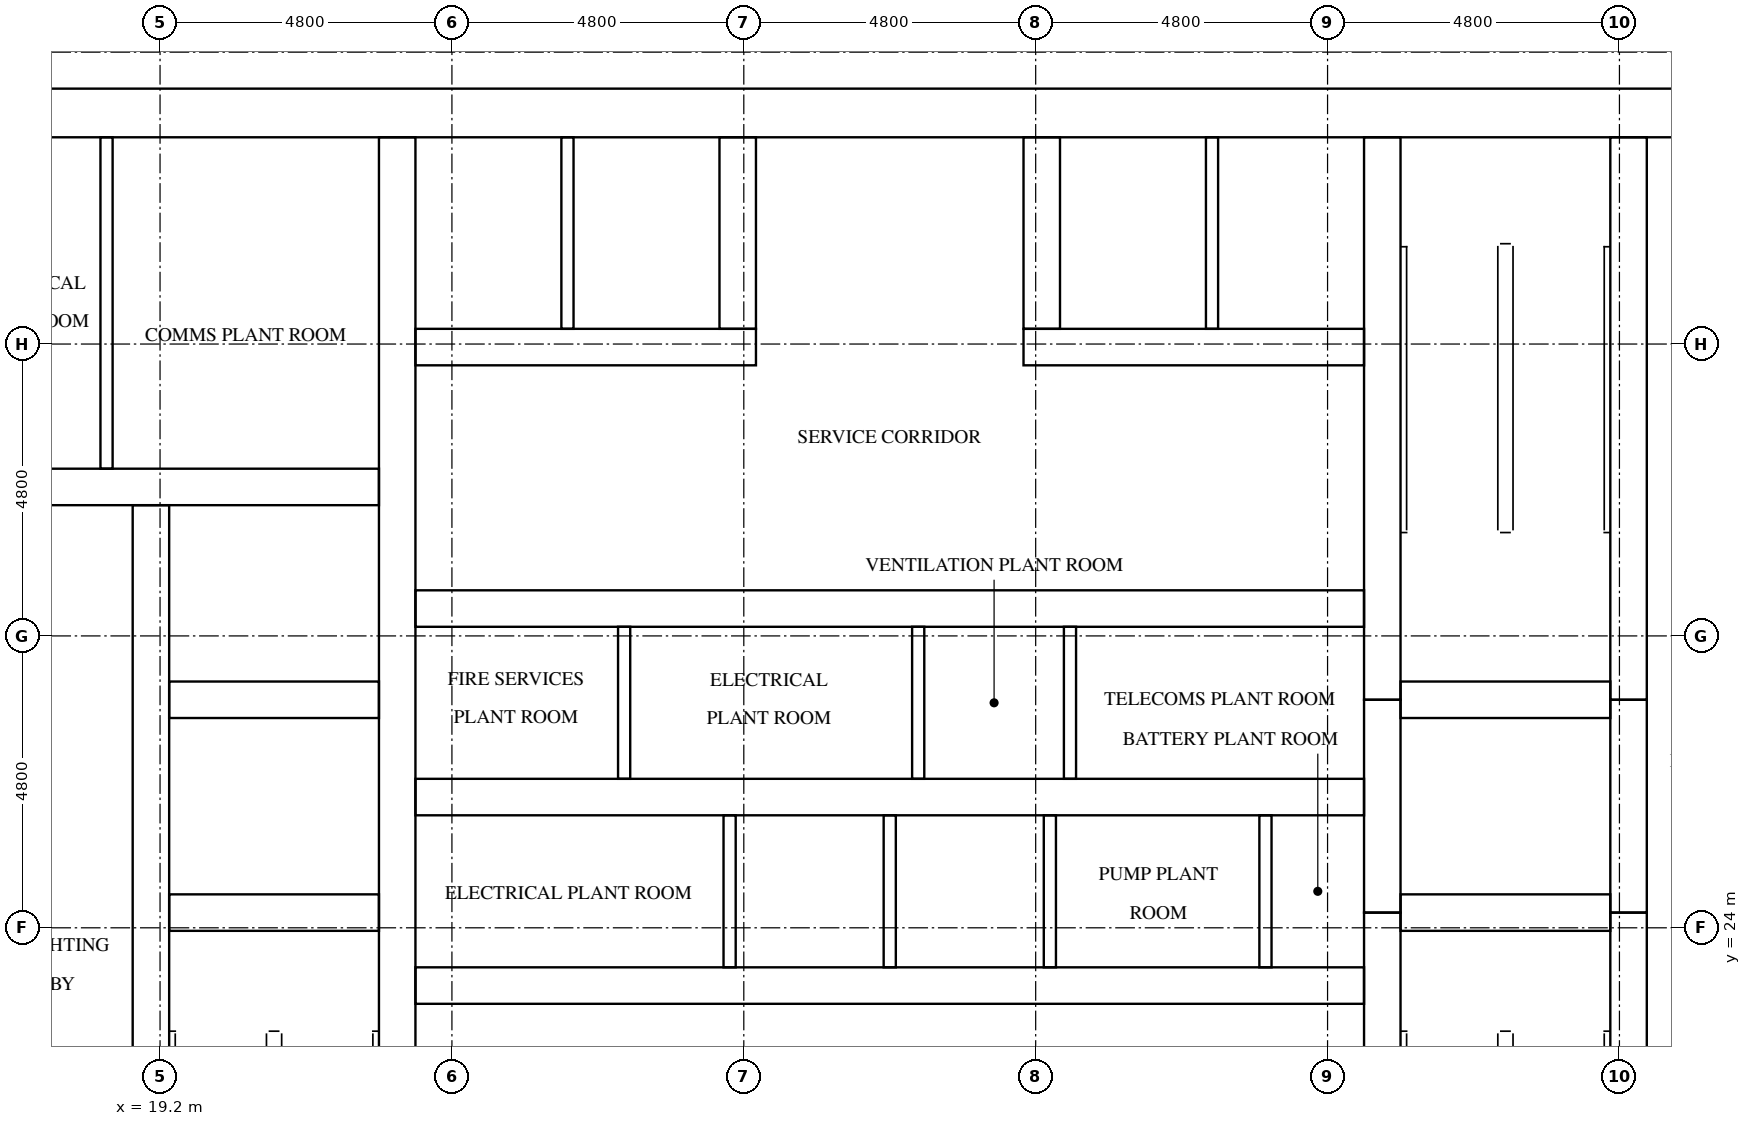
"""IFC4 building model, lengths in metres.
Left out: names, types, materials, properties, quantities, classifications, styles, units other than length and angle.
Written with IfcOpenShell. Run it as: python <this file> out.ifc"""

import sys

from ifc_helpers import new_model, si_unit, direction, frame, frame_2d, origin, place, context, subcontext, project, spatial, rectangle, extrude, element, fill, save


model = new_model("IFC4")
c1 = context("Model", 3, precision=1e-05, world=origin(), true_north=direction((0.0, 1.0)))
c2 = subcontext(c1, "Body", "Model", "MODEL_VIEW")
j1 = project(units=[si_unit("LENGTHUNIT", "METRE"), si_unit("PLANEANGLEUNIT", "RADIAN")], contexts=[c1])
p1 = place(None, origin())
s1 = spatial("IfcSite", under=j1, at=p1, CompositionType="ELEMENT")
p2 = place(p1, origin())
s2 = spatial("IfcBuilding", under=s1, at=p2, CompositionType="ELEMENT")
p3 = place(p2, frame((0.0, 0.0, 113.7)))
s3 = spatial("IfcBuildingStorey", under=s2, at=p3, CompositionType="ELEMENT", Elevation=113.7)
p4 = place(p3, frame((15.0, 37.4, 0.0), z_axis=(0.0, 0.0, 1.0), x_axis=(1.0, 0.0, 0.0)))
e1 = element("IfcWall", 1, at=p4, inside=s3, PredefinedType="SHEAR", context=c2, shape_type="SweptSolid", body=[
    extrude(rectangle(XDim=32.4, YDim=0.8, at=frame_2d((16.2, 0.0))), origin(), (0.0, 0.0, 1.0), 5.1),
])
p5 = place(p4, frame((15.3, 0.0, 0.0)))
e2 = element("IfcOpeningElement", 2, at=p5, cuts=e1, PredefinedType="OPENING", context=c2, shape_type="SweptSolid", body=[
    extrude(rectangle(XDim=1.8, YDim=2.1, at=frame_2d((0.9, 1.05))), frame((0.0, 0.41, 0.0), z_axis=(0.0, -1.0, 0.0), x_axis=(1.0, 0.0, 0.0)), (0.0, 0.0, 1.0), 0.82),
])
p6 = place(p4, frame((1.51, 0.0, 0.0)))
e3 = element("IfcOpeningElement", 3, at=p6, cuts=e1, PredefinedType="OPENING", context=c2, shape_type="SweptSolid", body=[
    extrude(rectangle(XDim=1.0, YDim=2.1, at=frame_2d((0.5, 1.05))), frame((0.0, 0.41, 0.0), z_axis=(0.0, -1.0, 0.0), x_axis=(1.0, 0.0, 0.0)), (0.0, 0.0, 1.0), 0.82),
])
p7 = place(p4, frame((5.11, 0.0, 0.0)))
e4 = element("IfcOpeningElement", 4, at=p7, cuts=e1, PredefinedType="OPENING", context=c2, shape_type="SweptSolid", body=[
    extrude(rectangle(XDim=1.0, YDim=2.1, at=frame_2d((0.5, 1.05))), frame((0.0, 0.41, 0.0), z_axis=(0.0, -1.0, 0.0), x_axis=(1.0, 0.0, 0.0)), (0.0, 0.0, 1.0), 0.82),
])
p8 = place(p3, frame((19.05, 15.8, 0.0), z_axis=(0.0, 0.0, 1.0), x_axis=(0.0, 1.0, 0.0)))
e5 = element("IfcWall", 5, at=p8, inside=s3, PredefinedType="SHEAR", context=c2, shape_type="SweptSolid", body=[
    extrude(rectangle(XDim=15.15, YDim=0.6, at=frame_2d((7.575, 0.0))), origin(), (0.0, 0.0, 1.0), 5.1),
])
p9 = place(p8, frame((9.65, 0.0, 0.0)))
e6 = element("IfcOpeningElement", 6, at=p9, cuts=e5, PredefinedType="OPENING", context=c2, shape_type="SweptSolid", body=[
    extrude(rectangle(XDim=1.1, YDim=2.1, at=frame_2d((0.55, 1.05))), frame((0.0, 0.31, 0.0), z_axis=(0.0, -1.0, 0.0), x_axis=(1.0, 0.0, 0.0)), (0.0, 0.0, 1.0), 0.62),
])
p10 = place(p8, frame((13.15, 0.0, 0.0)))
e7 = element("IfcOpeningElement", 7, at=p10, cuts=e5, PredefinedType="OPENING", context=c2, shape_type="SweptSolid", body=[
    extrude(rectangle(XDim=1.1, YDim=2.1, at=frame_2d((0.55, 1.05))), frame((0.0, 0.31, 0.0), z_axis=(0.0, -1.0, 0.0), x_axis=(1.0, 0.0, 0.0)), (0.0, 0.0, 1.0), 0.62),
])
p11 = place(p8, frame((0.4, 0.0, 0.0)))
e8 = element("IfcOpeningElement", 8, at=p11, cuts=e5, PredefinedType="OPENING", context=c2, shape_type="SweptSolid", body=[
    extrude(rectangle(XDim=1.2, YDim=2.1, at=frame_2d((0.6, 1.05))), frame((0.0, 0.31, 0.0), z_axis=(0.0, -1.0, 0.0), x_axis=(1.0, 0.0, 0.0)), (0.0, 0.0, 1.0), 0.62),
])
p12 = place(p3, frame((23.1, 15.8, 0.0), z_axis=(0.0, 0.0, 1.0), x_axis=(0.0, 1.0, 0.0)))
e9 = element("IfcWall", 9, at=p12, inside=s3, PredefinedType="SHEAR", context=c2, shape_type="SweptSolid", body=[
    extrude(rectangle(XDim=21.2, YDim=0.6, at=frame_2d((10.6, 0.0))), origin(), (0.0, 0.0, 1.0), 5.1),
])
p13 = place(p3, frame((39.3, 15.8, 0.0), z_axis=(0.0, 0.0, 1.0), x_axis=(0.0, 1.0, 0.0)))
e10 = element("IfcWall", 10, at=p13, inside=s3, PredefinedType="SHEAR", context=c2, shape_type="SweptSolid", body=[
    extrude(rectangle(XDim=8.45, YDim=0.6, at=frame_2d((4.225, 0.0))), origin(), (0.0, 0.0, 1.0), 5.1),
])
p14 = place(p3, frame((39.3, 24.25, 0.0), z_axis=(0.0, 0.0, 1.0), x_axis=(0.0, 1.0, 0.0)))
e11 = element("IfcWall", 11, at=p14, inside=s3, PredefinedType="SHEAR", context=c2, shape_type="SweptSolid", body=[
    extrude(rectangle(XDim=3.5, YDim=0.6, at=frame_2d((1.75, 0.0))), origin(), (0.0, 0.0, 1.0), 5.1),
])
p15 = place(p3, frame((39.3, 27.75, 0.0), z_axis=(0.0, 0.0, 1.0), x_axis=(0.0, 1.0, 0.0)))
e12 = element("IfcWall", 12, at=p15, inside=s3, PredefinedType="SHEAR", context=c2, shape_type="SweptSolid", body=[
    extrude(rectangle(XDim=9.25, YDim=0.6, at=frame_2d((4.625, 0.0))), origin(), (0.0, 0.0, 1.0), 5.1),
])
p16 = place(p3, frame((43.35, 15.8, 0.0), z_axis=(0.0, 0.0, 1.0), x_axis=(0.0, 1.0, 0.0)))
e13 = element("IfcWall", 13, at=p16, inside=s3, PredefinedType="SHEAR", context=c2, shape_type="SweptSolid", body=[
    extrude(rectangle(XDim=8.45, YDim=0.6, at=frame_2d((4.225, 0.0))), origin(), (0.0, 0.0, 1.0), 5.1),
])
p17 = place(p16, frame((0.4, 0.0, 0.0)))
e14 = element("IfcOpeningElement", 14, at=p17, cuts=e13, PredefinedType="OPENING", context=c2, shape_type="SweptSolid", body=[
    extrude(rectangle(XDim=1.2, YDim=2.1, at=frame_2d((0.6, 1.05))), frame((0.0, 0.31, 0.0), z_axis=(0.0, -1.0, 0.0), x_axis=(1.0, 0.0, 0.0)), (0.0, 0.0, 1.0), 0.62),
])
p18 = place(p3, frame((43.35, 24.25, 0.0), z_axis=(0.0, 0.0, 1.0), x_axis=(0.0, 1.0, 0.0)))
e15 = element("IfcWall", 15, at=p18, inside=s3, PredefinedType="SHEAR", context=c2, shape_type="SweptSolid", body=[
    extrude(rectangle(XDim=3.5, YDim=0.6, at=frame_2d((1.75, 0.0))), origin(), (0.0, 0.0, 1.0), 5.1),
])
p19 = place(p18, frame((1.2, 0.0, 0.0)))
e16 = element("IfcOpeningElement", 16, at=p19, cuts=e15, PredefinedType="OPENING", context=c2, shape_type="SweptSolid", body=[
    extrude(rectangle(XDim=1.1, YDim=2.1, at=frame_2d((0.55, 1.05))), frame((0.0, 0.31, 0.0), z_axis=(0.0, -1.0, 0.0), x_axis=(1.0, 0.0, 0.0)), (0.0, 0.0, 1.0), 0.62),
])
p20 = place(p3, frame((43.35, 27.75, 0.0), z_axis=(0.0, 0.0, 1.0), x_axis=(0.0, 1.0, 0.0)))
e17 = element("IfcWall", 17, at=p20, inside=s3, PredefinedType="SHEAR", context=c2, shape_type="SweptSolid", body=[
    extrude(rectangle(XDim=9.25, YDim=0.6, at=frame_2d((4.625, 0.0))), origin(), (0.0, 0.0, 1.0), 5.1),
])
p21 = place(p20, frame((7.65, 0.0, 0.0)))
e18 = element("IfcOpeningElement", 18, at=p21, cuts=e17, PredefinedType="OPENING", context=c2, shape_type="SweptSolid", body=[
    extrude(rectangle(XDim=1.2, YDim=2.1, at=frame_2d((0.6, 1.05))), frame((0.0, 0.31, 0.0), z_axis=(0.0, -1.0, 0.0), x_axis=(1.0, 0.0, 0.0)), (0.0, 0.0, 1.0), 0.62),
])
for number, where, z_axis, x_axis in (
    (19, (19.35, 24.25, 0.0), (0.0, 0.0, 1.0), (1.0, 0.0, 0.0)),
    (20, (19.35, 27.75, 0.0), (0.0, 0.0, 1.0), (1.0, 0.0, 0.0)),
):
    element("IfcWall", number, at=place(p3, frame(where, z_axis=z_axis, x_axis=x_axis)), inside=s3, PredefinedType="SHEAR", context=c2, shape_type="SweptSolid", body=[
        extrude(rectangle(XDim=3.45, YDim=0.6, at=frame_2d((1.725, 0.0))), origin(), (0.0, 0.0, 1.0), 5.1),
    ])
p22 = place(p3, frame((15.8, 31.25, 0.0), z_axis=(0.0, 0.0, 1.0), x_axis=(1.0, 0.0, 0.0)))
e21 = element("IfcWall", 21, at=p22, inside=s3, PredefinedType="SHEAR", context=c2, shape_type="SweptSolid", body=[
    extrude(rectangle(XDim=7.0, YDim=0.6, at=frame_2d((3.5, 0.0))), origin(), (0.0, 0.0, 1.0), 5.1),
])
for number, where, z_axis, x_axis in (
    (22, (39.6, 24.25, 0.0), (0.0, 0.0, 1.0), (1.0, 0.0, 0.0)),
    (23, (39.6, 27.75, 0.0), (0.0, 0.0, 1.0), (1.0, 0.0, 0.0)),
):
    element("IfcWall", number, at=place(p3, frame(where, z_axis=z_axis, x_axis=x_axis)), inside=s3, PredefinedType="SHEAR", context=c2, shape_type="SweptSolid", body=[
        extrude(rectangle(XDim=3.45, YDim=0.6, at=frame_2d((1.725, 0.0))), origin(), (0.0, 0.0, 1.0), 5.1),
    ])
p23 = place(p3, frame((23.4, 23.05, 0.0), z_axis=(0.0, 0.0, 1.0), x_axis=(1.0, 0.0, 0.0)))
e24 = element("IfcWall", 24, at=p23, inside=s3, PredefinedType="SHEAR", context=c2, shape_type="SweptSolid", body=[
    extrude(rectangle(XDim=15.6, YDim=0.6, at=frame_2d((7.8, 0.0))), origin(), (0.0, 0.0, 1.0), 5.1),
])
p24 = place(p23, frame((2.033, 0.0, 0.0)))
e25 = element("IfcOpeningElement", 25, at=p24, cuts=e24, PredefinedType="OPENING", context=c2, shape_type="SweptSolid", body=[
    extrude(rectangle(XDim=1.0, YDim=2.1, at=frame_2d((0.5, 1.05))), frame((0.0, 0.31, 0.0), z_axis=(0.0, -1.0, 0.0), x_axis=(1.0, 0.0, 0.0)), (0.0, 0.0, 1.0), 0.62),
])
p25 = place(p23, frame((11.706, 0.0, 0.0)))
e26 = element("IfcOpeningElement", 26, at=p25, cuts=e24, PredefinedType="OPENING", context=c2, shape_type="SweptSolid", body=[
    extrude(rectangle(XDim=1.0, YDim=2.1, at=frame_2d((0.5, 1.05))), frame((0.0, 0.31, 0.0), z_axis=(0.0, -1.0, 0.0), x_axis=(1.0, 0.0, 0.0)), (0.0, 0.0, 1.0), 0.62),
])
p26 = place(p23, frame((14.339, 0.0, 0.0)))
e27 = element("IfcOpeningElement", 27, at=p26, cuts=e24, PredefinedType="OPENING", context=c2, shape_type="SweptSolid", body=[
    extrude(rectangle(XDim=1.0, YDim=2.1, at=frame_2d((0.5, 1.05))), frame((0.0, 0.31, 0.0), z_axis=(0.0, -1.0, 0.0), x_axis=(1.0, 0.0, 0.0)), (0.0, 0.0, 1.0), 0.62),
])
p27 = place(p3, frame((23.4, 26.15, 0.0), z_axis=(0.0, 0.0, 1.0), x_axis=(1.0, 0.0, 0.0)))
e28 = element("IfcWall", 28, at=p27, inside=s3, PredefinedType="SHEAR", context=c2, shape_type="SweptSolid", body=[
    extrude(rectangle(XDim=15.6, YDim=0.6, at=frame_2d((7.8, 0.0))), origin(), (0.0, 0.0, 1.0), 5.1),
])
p28 = place(p3, frame((23.4, 29.25, 0.0), z_axis=(0.0, 0.0, 1.0), x_axis=(1.0, 0.0, 0.0)))
e29 = element("IfcWall", 29, at=p28, inside=s3, PredefinedType="SHEAR", context=c2, shape_type="SweptSolid", body=[
    extrude(rectangle(XDim=15.6, YDim=0.6, at=frame_2d((7.8, 0.0))), origin(), (0.0, 0.0, 1.0), 5.1),
])
p29 = place(p28, frame((1.166, 0.0, 0.0)))
e30 = element("IfcOpeningElement", 30, at=p29, cuts=e29, PredefinedType="OPENING", context=c2, shape_type="SweptSolid", body=[
    extrude(rectangle(XDim=1.0, YDim=2.1, at=frame_2d((0.5, 1.05))), frame((0.0, 0.31, 0.0), z_axis=(0.0, -1.0, 0.0), x_axis=(1.0, 0.0, 0.0)), (0.0, 0.0, 1.0), 0.62),
])
p30 = place(p28, frame((5.35, 0.0, 0.0)))
e31 = element("IfcOpeningElement", 31, at=p30, cuts=e29, PredefinedType="OPENING", context=c2, shape_type="SweptSolid", body=[
    extrude(rectangle(XDim=1.0, YDim=2.1, at=frame_2d((0.5, 1.05))), frame((0.0, 0.31, 0.0), z_axis=(0.0, -1.0, 0.0), x_axis=(1.0, 0.0, 0.0)), (0.0, 0.0, 1.0), 0.62),
])
p31 = place(p28, frame((9.016, 0.0, 0.0)))
e32 = element("IfcOpeningElement", 32, at=p31, cuts=e29, PredefinedType="OPENING", context=c2, shape_type="SweptSolid", body=[
    extrude(rectangle(XDim=1.0, YDim=2.1, at=frame_2d((0.5, 1.05))), frame((0.0, 0.31, 0.0), z_axis=(0.0, -1.0, 0.0), x_axis=(1.0, 0.0, 0.0)), (0.0, 0.0, 1.0), 0.62),
])
p32 = place(p28, frame((12.732, 0.0, 0.0)))
e33 = element("IfcOpeningElement", 33, at=p32, cuts=e29, PredefinedType="OPENING", context=c2, shape_type="SweptSolid", body=[
    extrude(rectangle(XDim=1.0, YDim=2.1, at=frame_2d((0.5, 1.05))), frame((0.0, 0.31, 0.0), z_axis=(0.0, -1.0, 0.0), x_axis=(1.0, 0.0, 0.0)), (0.0, 0.0, 1.0), 0.62),
])
for number, where, z_axis, x_axis in (
    (34, (23.4, 33.55, 0.0), (0.0, 0.0, 1.0), (1.0, 0.0, 0.0)),
    (35, (33.4, 33.55, 0.0), (0.0, 0.0, 1.0), (1.0, 0.0, 0.0)),
):
    element("IfcWall", number, at=place(p3, frame(where, z_axis=z_axis, x_axis=x_axis)), inside=s3, PredefinedType="SHEAR", context=c2, shape_type="SweptSolid", body=[
        extrude(rectangle(XDim=5.6, YDim=0.6, at=frame_2d((2.8, 0.0))), origin(), (0.0, 0.0, 1.0), 5.1),
    ])
for number, where, z_axis, x_axis in (
    (36, (28.7, 33.85, 0.0), (0.0, 0.0, 1.0), (0.0, 1.0, 0.0)),
    (37, (33.7, 33.85, 0.0), (0.0, 0.0, 1.0), (0.0, 1.0, 0.0)),
):
    element("IfcWall", number, at=place(p3, frame(where, z_axis=z_axis, x_axis=x_axis)), inside=s3, PredefinedType="SHEAR", context=c2, shape_type="SweptSolid", body=[
        extrude(rectangle(XDim=3.15, YDim=0.6, at=frame_2d((1.575, 0.0))), origin(), (0.0, 0.0, 1.0), 5.1),
    ])
for number, where, z_axis, x_axis in (
    (38, (28.567, 23.35, 0.0), (0.0, 0.0, 1.0), (0.0, 1.0, 0.0)),
    (39, (31.2, 23.35, 0.0), (0.0, 0.0, 1.0), (0.0, 1.0, 0.0)),
    (40, (33.833, 23.35, 0.0), (0.0, 0.0, 1.0), (0.0, 1.0, 0.0)),
):
    element("IfcWall", number, at=place(p3, frame(where, z_axis=z_axis, x_axis=x_axis)), inside=s3, PredefinedType="SOLIDWALL", context=c2, shape_type="SweptSolid", body=[
        extrude(rectangle(XDim=2.5, YDim=0.2, at=frame_2d((1.25, 0.0))), origin(), (0.0, 0.0, 1.0), 5.1),
    ])
for number, where, z_axis, x_axis in (
    (41, (25.9, 33.85, 0.0), (0.0, 0.0, 1.0), (0.0, 1.0, 0.0)),
    (42, (36.5, 33.85, 0.0), (0.0, 0.0, 1.0), (0.0, 1.0, 0.0)),
):
    element("IfcWall", number, at=place(p3, frame(where, z_axis=z_axis, x_axis=x_axis)), inside=s3, PredefinedType="SOLIDWALL", context=c2, shape_type="SweptSolid", body=[
        extrude(rectangle(XDim=3.15, YDim=0.2, at=frame_2d((1.575, 0.0))), origin(), (0.0, 0.0, 1.0), 5.1),
    ])
p33 = place(p3, frame((18.32, 31.55, 0.0), z_axis=(0.0, 0.0, 1.0), x_axis=(0.0, 1.0, 0.0)))
e43 = element("IfcWall", 43, at=p33, inside=s3, PredefinedType="PARTITIONING", context=c2, shape_type="SweptSolid", body=[
    extrude(rectangle(XDim=5.45, YDim=0.2, at=frame_2d((2.725, 0.0))), origin(), (0.0, 0.0, 1.0), 5.1),
])
for number, where, z_axis, x_axis in (
    (44, (37.379, 23.35, 0.0), (0.0, 0.0, 1.0), (0.0, 1.0, 0.0)),
    (45, (26.832, 26.45, 0.0), (0.0, 0.0, 1.0), (0.0, 1.0, 0.0)),
    (46, (31.668, 26.45, 0.0), (0.0, 0.0, 1.0), (0.0, 1.0, 0.0)),
    (47, (34.164, 26.45, 0.0), (0.0, 0.0, 1.0), (0.0, 1.0, 0.0)),
):
    element("IfcWall", number, at=place(p3, frame(where, z_axis=z_axis, x_axis=x_axis)), inside=s3, PredefinedType="PARTITIONING", context=c2, shape_type="SweptSolid", body=[
        extrude(rectangle(XDim=2.5, YDim=0.2, at=frame_2d((1.25, 0.0))), origin(), (0.0, 0.0, 1.0), 5.1),
    ])
p34 = place(p9, origin())
e48 = element("IfcDoor", 48, at=p34, inside=s3, OperationType="DOUBLE_DOOR_SLIDING", PredefinedType="DOOR", context=c2, shape_type="SweptSolid", body=[
    extrude(rectangle(XDim=1.1, YDim=2.1, at=frame_2d((0.55, 1.05))), frame((0.0, 0.025, 0.0), z_axis=(0.0, -1.0, 0.0), x_axis=(1.0, 0.0, 0.0)), (0.0, 0.0, 1.0), 0.05),
])
fill(e6, e48)
p35 = place(p10, origin())
e49 = element("IfcDoor", 49, at=p35, inside=s3, OperationType="DOUBLE_DOOR_SLIDING", PredefinedType="DOOR", context=c2, shape_type="SweptSolid", body=[
    extrude(rectangle(XDim=1.1, YDim=2.1, at=frame_2d((0.55, 1.05))), frame((0.0, 0.025, 0.0), z_axis=(0.0, -1.0, 0.0), x_axis=(1.0, 0.0, 0.0)), (0.0, 0.0, 1.0), 0.05),
])
fill(e7, e49)
p36 = place(p19, origin())
e50 = element("IfcDoor", 50, at=p36, inside=s3, OperationType="DOUBLE_DOOR_SLIDING", PredefinedType="DOOR", context=c2, shape_type="SweptSolid", body=[
    extrude(rectangle(XDim=1.1, YDim=2.1, at=frame_2d((0.55, 1.05))), frame((0.0, 0.025, 0.0), z_axis=(0.0, -1.0, 0.0), x_axis=(1.0, 0.0, 0.0)), (0.0, 0.0, 1.0), 0.05),
])
fill(e16, e50)
p37 = place(p21, origin())
e51 = element("IfcDoor", 51, at=p37, inside=s3, OperationType="SINGLE_SWING_LEFT", PredefinedType="DOOR", context=c2, shape_type="SweptSolid", body=[
    extrude(rectangle(XDim=1.2, YDim=2.1, at=frame_2d((0.6, 1.05))), frame((0.0, 0.025, 0.0), z_axis=(0.0, -1.0, 0.0), x_axis=(1.0, 0.0, 0.0)), (0.0, 0.0, 1.0), 0.05),
])
fill(e18, e51)
p38 = place(p5, origin())
e52 = element("IfcDoor", 52, at=p38, inside=s3, OperationType="DOUBLE_DOOR_SINGLE_SWING", PredefinedType="DOOR", context=c2, shape_type="SweptSolid", body=[
    extrude(rectangle(XDim=1.8, YDim=2.1, at=frame_2d((0.9, 1.05))), frame((0.0, 0.025, 0.0), z_axis=(0.0, -1.0, 0.0), x_axis=(1.0, 0.0, 0.0)), (0.0, 0.0, 1.0), 0.05),
])
fill(e2, e52)
p39 = place(p6, origin())
e53 = element("IfcDoor", 53, at=p39, inside=s3, OperationType="SINGLE_SWING_RIGHT", PredefinedType="DOOR", context=c2, shape_type="SweptSolid", body=[
    extrude(rectangle(XDim=1.0, YDim=2.1, at=frame_2d((0.5, 1.05))), frame((0.0, 0.025, 0.0), z_axis=(0.0, -1.0, 0.0), x_axis=(1.0, 0.0, 0.0)), (0.0, 0.0, 1.0), 0.05),
])
fill(e3, e53)
p40 = place(p7, origin())
e54 = element("IfcDoor", 54, at=p40, inside=s3, OperationType="SINGLE_SWING_LEFT", PredefinedType="DOOR", context=c2, shape_type="SweptSolid", body=[
    extrude(rectangle(XDim=1.0, YDim=2.1, at=frame_2d((0.5, 1.05))), frame((0.0, 0.025, 0.0), z_axis=(0.0, -1.0, 0.0), x_axis=(1.0, 0.0, 0.0)), (0.0, 0.0, 1.0), 0.05),
])
fill(e4, e54)
p41 = place(p24, frame((1.0, 0.0, 0.0), z_axis=(0.0, 0.0, 1.0), x_axis=(-1.0, 0.0, 0.0)))
e55 = element("IfcDoor", 55, at=p41, inside=s3, OperationType="SINGLE_SWING_RIGHT", PredefinedType="DOOR", context=c2, shape_type="SweptSolid", body=[
    extrude(rectangle(XDim=1.0, YDim=2.1, at=frame_2d((0.5, 1.05))), frame((0.0, 0.025, 0.0), z_axis=(0.0, -1.0, 0.0), x_axis=(1.0, 0.0, 0.0)), (0.0, 0.0, 1.0), 0.05),
])
fill(e25, e55)
p42 = place(p25, frame((1.0, 0.0, 0.0), z_axis=(0.0, 0.0, 1.0), x_axis=(-1.0, 0.0, 0.0)))
e56 = element("IfcDoor", 56, at=p42, inside=s3, OperationType="SINGLE_SWING_LEFT", PredefinedType="DOOR", context=c2, shape_type="SweptSolid", body=[
    extrude(rectangle(XDim=1.0, YDim=2.1, at=frame_2d((0.5, 1.05))), frame((0.0, 0.025, 0.0), z_axis=(0.0, -1.0, 0.0), x_axis=(1.0, 0.0, 0.0)), (0.0, 0.0, 1.0), 0.05),
])
fill(e26, e56)
p43 = place(p26, frame((1.0, 0.0, 0.0), z_axis=(0.0, 0.0, 1.0), x_axis=(-1.0, 0.0, 0.0)))
e57 = element("IfcDoor", 57, at=p43, inside=s3, OperationType="SINGLE_SWING_RIGHT", PredefinedType="DOOR", context=c2, shape_type="SweptSolid", body=[
    extrude(rectangle(XDim=1.0, YDim=2.1, at=frame_2d((0.5, 1.05))), frame((0.0, 0.025, 0.0), z_axis=(0.0, -1.0, 0.0), x_axis=(1.0, 0.0, 0.0)), (0.0, 0.0, 1.0), 0.05),
])
fill(e27, e57)
p44 = place(p29, origin())
e58 = element("IfcDoor", 58, at=p44, inside=s3, OperationType="SINGLE_SWING_LEFT", PredefinedType="DOOR", context=c2, shape_type="SweptSolid", body=[
    extrude(rectangle(XDim=1.0, YDim=2.1, at=frame_2d((0.5, 1.05))), frame((0.0, 0.025, 0.0), z_axis=(0.0, -1.0, 0.0), x_axis=(1.0, 0.0, 0.0)), (0.0, 0.0, 1.0), 0.05),
])
fill(e30, e58)
p45 = place(p30, origin())
e59 = element("IfcDoor", 59, at=p45, inside=s3, OperationType="SINGLE_SWING_RIGHT", PredefinedType="DOOR", context=c2, shape_type="SweptSolid", body=[
    extrude(rectangle(XDim=1.0, YDim=2.1, at=frame_2d((0.5, 1.05))), frame((0.0, 0.025, 0.0), z_axis=(0.0, -1.0, 0.0), x_axis=(1.0, 0.0, 0.0)), (0.0, 0.0, 1.0), 0.05),
])
fill(e31, e59)
p46 = place(p31, origin())
e60 = element("IfcDoor", 60, at=p46, inside=s3, OperationType="SINGLE_SWING_LEFT", PredefinedType="DOOR", context=c2, shape_type="SweptSolid", body=[
    extrude(rectangle(XDim=1.0, YDim=2.1, at=frame_2d((0.5, 1.05))), frame((0.0, 0.025, 0.0), z_axis=(0.0, -1.0, 0.0), x_axis=(1.0, 0.0, 0.0)), (0.0, 0.0, 1.0), 0.05),
])
fill(e32, e60)
p47 = place(p32, origin())
e61 = element("IfcDoor", 61, at=p47, inside=s3, OperationType="SINGLE_SWING_RIGHT", PredefinedType="DOOR", context=c2, shape_type="SweptSolid", body=[
    extrude(rectangle(XDim=1.0, YDim=2.1, at=frame_2d((0.5, 1.05))), frame((0.0, 0.025, 0.0), z_axis=(0.0, -1.0, 0.0), x_axis=(1.0, 0.0, 0.0)), (0.0, 0.0, 1.0), 0.05),
])
fill(e33, e61)
save(model, sys.argv[1])
